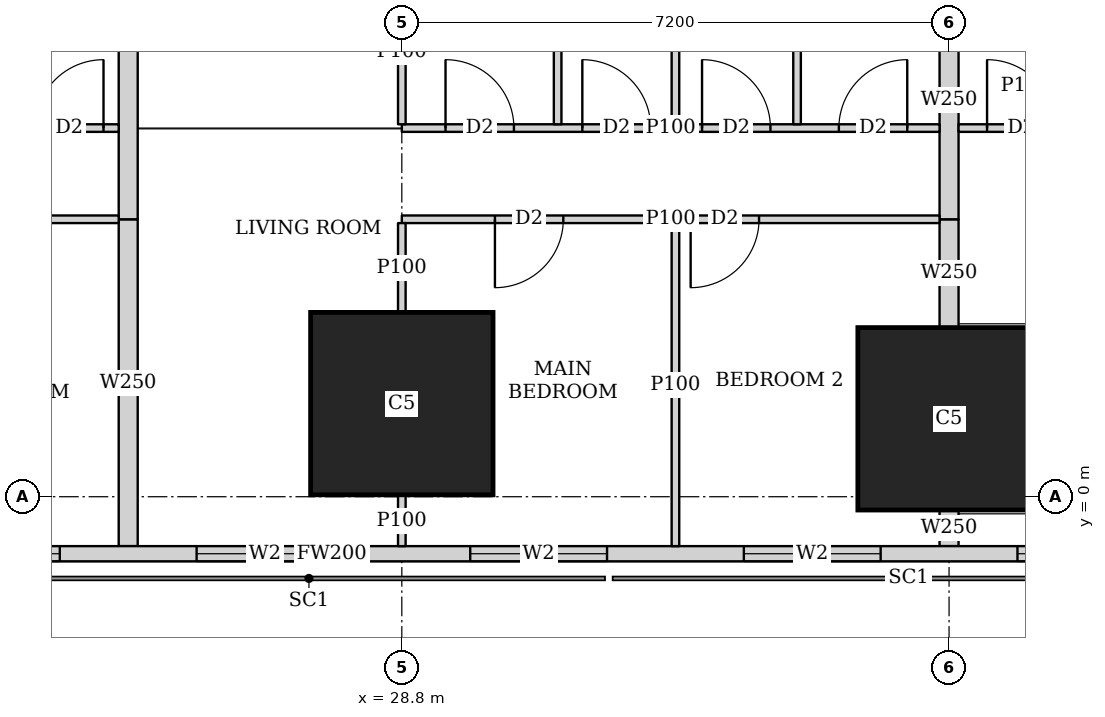
"""IFC4 building model, lengths in metres.
Left out: names, types, materials, properties, quantities, classifications, styles, units other than length and angle.
Written with IfcOpenShell. Run it as: python <this file> out.ifc"""

import sys

from ifc_helpers import new_model, si_unit, direction, frame, frame_2d, origin, origin_2d, place, context, subcontext, project, spatial, rectangle, extrude, element, fill, save


model = new_model("IFC4")
c1 = context("Model", 3, precision=1e-05, world=origin(), true_north=direction((0.0, 1.0)))
c2 = subcontext(c1, "Body", "Model", "MODEL_VIEW")
j1 = project(units=[si_unit("LENGTHUNIT", "METRE"), si_unit("PLANEANGLEUNIT", "RADIAN")], contexts=[c1])
p1 = place(None, origin())
s1 = spatial("IfcSite", under=j1, at=p1, CompositionType="ELEMENT")
p2 = place(p1, origin())
s2 = spatial("IfcBuilding", under=s1, at=p2, CompositionType="ELEMENT")
p3 = place(p2, frame((0.0, 0.0, 212.45)))
s3 = spatial("IfcBuildingStorey", under=s2, at=p3, CompositionType="ELEMENT", Elevation=212.45)
for number, where, z_axis, x_axis in (
    (1, (28.8, 1.225, 0.0), (0.0, 0.0, 1.0), (1.0, 0.0, 0.0)),
    (2, (36.0, 1.025, 0.0), (0.0, 0.0, 1.0), (1.0, 0.0, 0.0)),
):
    element("IfcColumn", number, at=place(p3, frame(where, z_axis=z_axis, x_axis=x_axis)), inside=s3, PredefinedType="COLUMN", context=c2, shape_type="SweptSolid", body=[
        extrude(rectangle(XDim=2.4, YDim=2.4, at=origin_2d()), origin(), (0.0, 0.0, 1.0), 3.75),
    ])
p4 = place(p3, frame((7.363, -0.75, 0.0), z_axis=(0.0, 0.0, 1.0), x_axis=(1.0, 0.0, 0.0)))
e3 = element("IfcWall", 3, at=p4, inside=s3, PredefinedType="SOLIDWALL", context=c2, shape_type="SweptSolid", body=[
    extrude(rectangle(XDim=40.428, YDim=0.2, at=frame_2d((20.214, 0.0))), origin(), (0.0, 0.0, 1.0), 3.5),
])
p5 = place(p4, frame((2.319, 0.0, 0.9)))
e4 = element("IfcOpeningElement", 4, at=p5, cuts=e3, PredefinedType="OPENING", context=c2, shape_type="SweptSolid", body=[
    extrude(rectangle(XDim=2.4, YDim=1.5, at=frame_2d((1.2, 0.75))), frame((0.0, 0.11, 0.0), z_axis=(0.0, -1.0, 0.0), x_axis=(1.0, 0.0, 0.0)), (0.0, 0.0, 1.0), 0.22),
])
p6 = place(p4, frame((7.937, 0.0, 0.9)))
e5 = element("IfcOpeningElement", 5, at=p6, cuts=e3, PredefinedType="OPENING", context=c2, shape_type="SweptSolid", body=[
    extrude(rectangle(XDim=1.8, YDim=1.5, at=frame_2d((0.9, 0.75))), frame((0.0, 0.11, 0.0), z_axis=(0.0, -1.0, 0.0), x_axis=(1.0, 0.0, 0.0)), (0.0, 0.0, 1.0), 0.22),
])
p7 = place(p4, frame((11.537, 0.0, 0.9)))
e6 = element("IfcOpeningElement", 6, at=p7, cuts=e3, PredefinedType="OPENING", context=c2, shape_type="SweptSolid", body=[
    extrude(rectangle(XDim=1.8, YDim=1.5, at=frame_2d((0.9, 0.75))), frame((0.0, 0.11, 0.0), z_axis=(0.0, -1.0, 0.0), x_axis=(1.0, 0.0, 0.0)), (0.0, 0.0, 1.0), 0.22),
])
p8 = place(p4, frame((15.137, 0.0, 0.9)))
e7 = element("IfcOpeningElement", 7, at=p8, cuts=e3, PredefinedType="OPENING", context=c2, shape_type="SweptSolid", body=[
    extrude(rectangle(XDim=1.8, YDim=1.5, at=frame_2d((0.9, 0.75))), frame((0.0, 0.11, 0.0), z_axis=(0.0, -1.0, 0.0), x_axis=(1.0, 0.0, 0.0)), (0.0, 0.0, 1.0), 0.22),
])
p9 = place(p4, frame((18.737, 0.0, 0.9)))
e8 = element("IfcOpeningElement", 8, at=p9, cuts=e3, PredefinedType="OPENING", context=c2, shape_type="SweptSolid", body=[
    extrude(rectangle(XDim=1.8, YDim=1.5, at=frame_2d((0.9, 0.75))), frame((0.0, 0.11, 0.0), z_axis=(0.0, -1.0, 0.0), x_axis=(1.0, 0.0, 0.0)), (0.0, 0.0, 1.0), 0.22),
])
p10 = place(p4, frame((22.337, 0.0, 0.9)))
e9 = element("IfcOpeningElement", 9, at=p10, cuts=e3, PredefinedType="OPENING", context=c2, shape_type="SweptSolid", body=[
    extrude(rectangle(XDim=1.8, YDim=1.5, at=frame_2d((0.9, 0.75))), frame((0.0, 0.11, 0.0), z_axis=(0.0, -1.0, 0.0), x_axis=(1.0, 0.0, 0.0)), (0.0, 0.0, 1.0), 0.22),
])
p11 = place(p4, frame((25.937, 0.0, 0.9)))
e10 = element("IfcOpeningElement", 10, at=p11, cuts=e3, PredefinedType="OPENING", context=c2, shape_type="SweptSolid", body=[
    extrude(rectangle(XDim=1.8, YDim=1.5, at=frame_2d((0.9, 0.75))), frame((0.0, 0.11, 0.0), z_axis=(0.0, -1.0, 0.0), x_axis=(1.0, 0.0, 0.0)), (0.0, 0.0, 1.0), 0.22),
])
p12 = place(p4, frame((29.537, 0.0, 0.9)))
e11 = element("IfcOpeningElement", 11, at=p12, cuts=e3, PredefinedType="OPENING", context=c2, shape_type="SweptSolid", body=[
    extrude(rectangle(XDim=1.8, YDim=1.5, at=frame_2d((0.9, 0.75))), frame((0.0, 0.11, 0.0), z_axis=(0.0, -1.0, 0.0), x_axis=(1.0, 0.0, 0.0)), (0.0, 0.0, 1.0), 0.22),
])
p13 = place(p3, frame((33.68, 42.723, 0.0), z_axis=(0.0, 0.0, 1.0), x_axis=(0.185601160014, -0.982625162207, 0.0)))
e12 = element("IfcWall", 12, at=p13, inside=s3, PredefinedType="SOLIDWALL", context=c2, shape_type="SweptSolid", body=[
    extrude(rectangle(XDim=41.051, YDim=0.15, at=frame_2d((20.526, 0.0))), origin(), (0.0, 0.0, 1.0), 2.5),
])
p14 = place(p13, frame((12.307, 0.0, 0.0)))
e13 = element("IfcOpeningElement", 13, at=p14, cuts=e12, PredefinedType="OPENING", context=c2, shape_type="SweptSolid", body=[
    extrude(rectangle(XDim=1.0, YDim=2.1, at=frame_2d((0.5, 1.05))), frame((0.0, 0.085, 0.0), z_axis=(0.0, -1.0, 0.0), x_axis=(1.0, 0.0, 0.0)), (0.0, 0.0, 1.0), 0.17),
])
p15 = place(p13, frame((16.123, 0.0, 0.0)))
e14 = element("IfcOpeningElement", 14, at=p15, cuts=e12, PredefinedType="OPENING", context=c2, shape_type="SweptSolid", body=[
    extrude(rectangle(XDim=1.0, YDim=2.1, at=frame_2d((0.5, 1.05))), frame((0.0, 0.085, 0.0), z_axis=(0.0, -1.0, 0.0), x_axis=(1.0, 0.0, 0.0)), (0.0, 0.0, 1.0), 0.17),
])
p16 = place(p13, frame((30.902, 0.0, 0.0)))
e15 = element("IfcOpeningElement", 15, at=p16, cuts=e12, PredefinedType="OPENING", context=c2, shape_type="SweptSolid", body=[
    extrude(rectangle(XDim=1.0, YDim=2.1, at=frame_2d((0.5, 1.05))), frame((0.0, 0.085, 0.0), z_axis=(0.0, -1.0, 0.0), x_axis=(1.0, 0.0, 0.0)), (0.0, 0.0, 1.0), 0.17),
])
p17 = place(p3, frame((25.075, 3.65, 0.0), z_axis=(0.0, 0.0, 1.0), x_axis=(-1.0, 0.0, 0.0)))
e16 = element("IfcWall", 16, at=p17, inside=s3, PredefinedType="PARTITIONING", context=c2, shape_type="SweptSolid", body=[
    extrude(rectangle(XDim=3.475, YDim=0.1, at=frame_2d((1.737, 0.0))), origin(), (0.0, 0.0, 1.0), 3.5),
])
p18 = place(p17, frame((2.375, 0.0, 0.0)))
e17 = element("IfcOpeningElement", 17, at=p18, cuts=e16, PredefinedType="OPENING", context=c2, shape_type="SweptSolid", body=[
    extrude(rectangle(XDim=0.9, YDim=2.1, at=frame_2d((0.45, 1.05))), frame((0.0, 0.06, 0.0), z_axis=(0.0, -1.0, 0.0), x_axis=(1.0, 0.0, 0.0)), (0.0, 0.0, 1.0), 0.12),
])
p19 = place(p3, frame((25.075, 4.85, 0.0), z_axis=(0.0, 0.0, 1.0), x_axis=(-1.0, 0.0, 0.0)))
e18 = element("IfcWall", 18, at=p19, inside=s3, PredefinedType="PARTITIONING", context=c2, shape_type="SweptSolid", body=[
    extrude(rectangle(XDim=3.475, YDim=0.1, at=frame_2d((1.737, 0.0))), origin(), (0.0, 0.0, 1.0), 3.5),
])
p20 = place(p19, frame((2.0, 0.0, 0.0)))
e19 = element("IfcOpeningElement", 19, at=p20, cuts=e18, PredefinedType="OPENING", context=c2, shape_type="SweptSolid", body=[
    extrude(rectangle(XDim=0.9, YDim=2.1, at=frame_2d((0.45, 1.05))), frame((0.0, 0.06, 0.0), z_axis=(0.0, -1.0, 0.0), x_axis=(1.0, 0.0, 0.0)), (0.0, 0.0, 1.0), 0.12),
])
p21 = place(p19, frame((0.2, 0.0, 0.0)))
e20 = element("IfcOpeningElement", 20, at=p21, cuts=e18, PredefinedType="OPENING", context=c2, shape_type="SweptSolid", body=[
    extrude(rectangle(XDim=0.9, YDim=2.1, at=frame_2d((0.45, 1.05))), frame((0.0, 0.06, 0.0), z_axis=(0.0, -1.0, 0.0), x_axis=(1.0, 0.0, 0.0)), (0.0, 0.0, 1.0), 0.12),
])
p22 = place(p3, frame((35.875, 3.65, 0.0), z_axis=(0.0, 0.0, 1.0), x_axis=(-1.0, 0.0, 0.0)))
e21 = element("IfcWall", 21, at=p22, inside=s3, PredefinedType="PARTITIONING", context=c2, shape_type="SweptSolid", body=[
    extrude(rectangle(XDim=7.075, YDim=0.1, at=frame_2d((3.538, 0.0))), origin(), (0.0, 0.0, 1.0), 3.5),
])
p23 = place(p22, frame((4.95, 0.0, 0.0)))
e22 = element("IfcOpeningElement", 22, at=p23, cuts=e21, PredefinedType="OPENING", context=c2, shape_type="SweptSolid", body=[
    extrude(rectangle(XDim=0.9, YDim=2.1, at=frame_2d((0.45, 1.05))), frame((0.0, 0.06, 0.0), z_axis=(0.0, -1.0, 0.0), x_axis=(1.0, 0.0, 0.0)), (0.0, 0.0, 1.0), 0.12),
])
p24 = place(p22, frame((2.375, 0.0, 0.0)))
e23 = element("IfcOpeningElement", 23, at=p24, cuts=e21, PredefinedType="OPENING", context=c2, shape_type="SweptSolid", body=[
    extrude(rectangle(XDim=0.9, YDim=2.1, at=frame_2d((0.45, 1.05))), frame((0.0, 0.06, 0.0), z_axis=(0.0, -1.0, 0.0), x_axis=(1.0, 0.0, 0.0)), (0.0, 0.0, 1.0), 0.12),
])
p25 = place(p3, frame((35.875, 4.85, 0.0), z_axis=(0.0, 0.0, 1.0), x_axis=(-1.0, 0.0, 0.0)))
e24 = element("IfcWall", 24, at=p25, inside=s3, PredefinedType="PARTITIONING", context=c2, shape_type="SweptSolid", body=[
    extrude(rectangle(XDim=7.075, YDim=0.1, at=frame_2d((3.538, 0.0))), origin(), (0.0, 0.0, 1.0), 3.5),
])
p26 = place(p25, frame((5.6, 0.0, 0.0)))
e25 = element("IfcOpeningElement", 25, at=p26, cuts=e24, PredefinedType="OPENING", context=c2, shape_type="SweptSolid", body=[
    extrude(rectangle(XDim=0.9, YDim=2.1, at=frame_2d((0.45, 1.05))), frame((0.0, 0.06, 0.0), z_axis=(0.0, -1.0, 0.0), x_axis=(1.0, 0.0, 0.0)), (0.0, 0.0, 1.0), 0.12),
])
p27 = place(p25, frame((2.225, 0.0, 0.0)))
e26 = element("IfcOpeningElement", 26, at=p27, cuts=e24, PredefinedType="OPENING", context=c2, shape_type="SweptSolid", body=[
    extrude(rectangle(XDim=0.9, YDim=2.1, at=frame_2d((0.45, 1.05))), frame((0.0, 0.06, 0.0), z_axis=(0.0, -1.0, 0.0), x_axis=(1.0, 0.0, 0.0)), (0.0, 0.0, 1.0), 0.12),
])
p28 = place(p25, frame((3.8, 0.0, 0.0)))
e27 = element("IfcOpeningElement", 27, at=p28, cuts=e24, PredefinedType="OPENING", context=c2, shape_type="SweptSolid", body=[
    extrude(rectangle(XDim=0.9, YDim=2.1, at=frame_2d((0.45, 1.05))), frame((0.0, 0.06, 0.0), z_axis=(0.0, -1.0, 0.0), x_axis=(1.0, 0.0, 0.0)), (0.0, 0.0, 1.0), 0.12),
])
p29 = place(p25, frame((0.425, 0.0, 0.0)))
e28 = element("IfcOpeningElement", 28, at=p29, cuts=e24, PredefinedType="OPENING", context=c2, shape_type="SweptSolid", body=[
    extrude(rectangle(XDim=0.9, YDim=2.1, at=frame_2d((0.45, 1.05))), frame((0.0, 0.06, 0.0), z_axis=(0.0, -1.0, 0.0), x_axis=(1.0, 0.0, 0.0)), (0.0, 0.0, 1.0), 0.12),
])
p30 = place(p3, frame((28.8, -0.65, 0.0), z_axis=(0.0, 0.0, 1.0), x_axis=(0.0, 1.0, 0.0)))
e29 = element("IfcWall", 29, at=p30, inside=s3, PredefinedType="PARTITIONING", context=c2, shape_type="SweptSolid", body=[
    extrude(rectangle(XDim=0.674, YDim=0.1, at=frame_2d((0.337, 0.0))), origin(), (0.0, 0.0, 1.0), 3.5),
])
p31 = place(p3, frame((28.8, 2.426, 0.0), z_axis=(0.0, 0.0, 1.0), x_axis=(0.0, 1.0, 0.0)))
e30 = element("IfcWall", 30, at=p31, inside=s3, PredefinedType="PARTITIONING", context=c2, shape_type="SweptSolid", body=[
    extrude(rectangle(XDim=1.174, YDim=0.1, at=frame_2d((0.587, 0.0))), origin(), (0.0, 0.0, 1.0), 3.5),
])
p32 = place(p3, frame((32.4, -0.65, 0.0), z_axis=(0.0, 0.0, 1.0), x_axis=(0.0, 1.0, 0.0)))
e31 = element("IfcWall", 31, at=p32, inside=s3, PredefinedType="PARTITIONING", context=c2, shape_type="SweptSolid", body=[
    extrude(rectangle(XDim=4.25, YDim=0.1, at=frame_2d((2.125, 0.0))), origin(), (0.0, 0.0, 1.0), 2.05),
])
p33 = place(p3, frame((28.8, 4.9, 0.0), z_axis=(0.0, 0.0, 1.0), x_axis=(0.0, 1.0, 0.0)))
e32 = element("IfcWall", 32, at=p33, inside=s3, PredefinedType="PARTITIONING", context=c2, shape_type="SweptSolid", body=[
    extrude(rectangle(XDim=1.899, YDim=0.1, at=frame_2d((0.95, 0.0))), origin(), (0.0, 0.0, 1.0), 3.5),
])
for number, where, z_axis, x_axis in (
    (33, (32.4, 4.9, 0.0), (0.0, 0.0, 1.0), (0.0, 1.0, 0.0)),
    (34, (30.85, 4.9, 0.0), (0.0, 0.0, 1.0), (0.0, 1.0, 0.0)),
    (35, (34.0, 4.9, 0.0), (0.0, 0.0, 1.0), (0.0, 1.0, 0.0)),
):
    element("IfcWall", number, at=place(p3, frame(where, z_axis=z_axis, x_axis=x_axis)), inside=s3, PredefinedType="PARTITIONING", context=c2, shape_type="SweptSolid", body=[
        extrude(rectangle(XDim=3.525, YDim=0.1, at=frame_2d((1.763, 0.0))), origin(), (0.0, 0.0, 1.0), 3.5),
    ])
p34 = place(p3, frame((25.2, -0.65, 0.0), z_axis=(0.0, 0.0, 1.0), x_axis=(0.0, 1.0, 0.0)))
e36 = element("IfcWall", 36, at=p34, inside=s3, PredefinedType="SOLIDWALL", context=c2, shape_type="SweptSolid", body=[
    extrude(rectangle(XDim=4.3, YDim=0.25, at=frame_2d((2.15, 0.0))), origin(), (0.0, 0.0, 1.0), 2.05),
])
p35 = place(p3, frame((25.2, 3.65, 0.0), z_axis=(0.0, 0.0, 1.0), x_axis=(0.0, 1.0, 0.0)))
e37 = element("IfcWall", 37, at=p35, inside=s3, PredefinedType="SOLIDWALL", context=c2, shape_type="SweptSolid", body=[
    extrude(rectangle(XDim=4.775, YDim=0.25, at=frame_2d((2.388, 0.0))), origin(), (0.0, 0.0, 1.0), 3.5),
])
p36 = place(p3, frame((37.89, 4.85, 0.0), z_axis=(0.0, 0.0, 1.0), x_axis=(-1.0, 0.0, 0.0)))
e38 = element("IfcWall", 38, at=p36, inside=s3, PredefinedType="PARTITIONING", context=c2, shape_type="SweptSolid", body=[
    extrude(rectangle(XDim=1.765, YDim=0.1, at=frame_2d((0.882, 0.0))), origin(), (0.0, 0.0, 1.0), 3.5),
])
p37 = place(p36, frame((0.49, 0.0, 0.0)))
e39 = element("IfcOpeningElement", 39, at=p37, cuts=e38, PredefinedType="OPENING", context=c2, shape_type="SweptSolid", body=[
    extrude(rectangle(XDim=0.9, YDim=2.1, at=frame_2d((0.45, 1.05))), frame((0.0, 0.06, 0.0), z_axis=(0.0, -1.0, 0.0), x_axis=(1.0, 0.0, 0.0)), (0.0, 0.0, 1.0), 0.12),
])
p38 = place(p3, frame((36.0, -0.65, 0.0), z_axis=(0.0, 0.0, 1.0), x_axis=(0.0, 1.0, 0.0)))
e40 = element("IfcWall", 40, at=p38, inside=s3, PredefinedType="SOLIDWALL", context=c2, shape_type="SweptSolid", body=[
    extrude(rectangle(XDim=0.474, YDim=0.25, at=frame_2d((0.237, 0.0))), origin(), (0.0, 0.0, 1.0), 2.05),
])
p39 = place(p3, frame((36.0, 2.226, 0.0), z_axis=(0.0, 0.0, 1.0), x_axis=(0.0, 1.0, 0.0)))
e41 = element("IfcWall", 41, at=p39, inside=s3, PredefinedType="SOLIDWALL", context=c2, shape_type="SweptSolid", body=[
    extrude(rectangle(XDim=1.424, YDim=0.25, at=frame_2d((0.712, 0.0))), origin(), (0.0, 0.0, 1.0), 2.05),
])
p40 = place(p3, frame((36.0, 3.65, 0.0), z_axis=(0.0, 0.0, 1.0), x_axis=(0.0, 1.0, 0.0)))
e42 = element("IfcWall", 42, at=p40, inside=s3, PredefinedType="SOLIDWALL", context=c2, shape_type="SweptSolid", body=[
    extrude(rectangle(XDim=3.149, YDim=0.25, at=frame_2d((1.575, 0.0))), origin(), (0.0, 0.0, 1.0), 3.5),
])
p41 = place(p8, origin())
e43 = element("IfcWindow", 43, at=p41, inside=s3, PartitioningType="SINGLE_PANEL", PredefinedType="WINDOW", context=c2, shape_type="SweptSolid", body=[
    extrude(rectangle(XDim=1.8, YDim=1.5, at=frame_2d((0.9, 0.75))), frame((0.0, 0.03, 0.0), z_axis=(0.0, -1.0, 0.0), x_axis=(1.0, 0.0, 0.0)), (0.0, 0.0, 1.0), 0.06),
])
fill(e7, e43)
p42 = place(p9, origin())
e44 = element("IfcWindow", 44, at=p42, inside=s3, PartitioningType="SINGLE_PANEL", PredefinedType="WINDOW", context=c2, shape_type="SweptSolid", body=[
    extrude(rectangle(XDim=1.8, YDim=1.5, at=frame_2d((0.9, 0.75))), frame((0.0, 0.03, 0.0), z_axis=(0.0, -1.0, 0.0), x_axis=(1.0, 0.0, 0.0)), (0.0, 0.0, 1.0), 0.06),
])
fill(e8, e44)
p43 = place(p10, origin())
e45 = element("IfcWindow", 45, at=p43, inside=s3, PartitioningType="SINGLE_PANEL", PredefinedType="WINDOW", context=c2, shape_type="SweptSolid", body=[
    extrude(rectangle(XDim=1.8, YDim=1.5, at=frame_2d((0.9, 0.75))), frame((0.0, 0.03, 0.0), z_axis=(0.0, -1.0, 0.0), x_axis=(1.0, 0.0, 0.0)), (0.0, 0.0, 1.0), 0.06),
])
fill(e9, e45)
p44 = place(p11, origin())
e46 = element("IfcWindow", 46, at=p44, inside=s3, PartitioningType="SINGLE_PANEL", PredefinedType="WINDOW", context=c2, shape_type="SweptSolid", body=[
    extrude(rectangle(XDim=1.8, YDim=1.5, at=frame_2d((0.9, 0.75))), frame((0.0, 0.03, 0.0), z_axis=(0.0, -1.0, 0.0), x_axis=(1.0, 0.0, 0.0)), (0.0, 0.0, 1.0), 0.06),
])
fill(e10, e46)
p45 = place(p12, origin())
e47 = element("IfcWindow", 47, at=p45, inside=s3, PartitioningType="SINGLE_PANEL", PredefinedType="WINDOW", context=c2, shape_type="SweptSolid", body=[
    extrude(rectangle(XDim=1.8, YDim=1.5, at=frame_2d((0.9, 0.75))), frame((0.0, 0.03, 0.0), z_axis=(0.0, -1.0, 0.0), x_axis=(1.0, 0.0, 0.0)), (0.0, 0.0, 1.0), 0.06),
])
fill(e11, e47)
p46 = place(p21, origin())
e48 = element("IfcDoor", 48, at=p46, inside=s3, OperationType="SINGLE_SWING_RIGHT", PredefinedType="DOOR", context=c2, shape_type="SweptSolid", body=[
    extrude(rectangle(XDim=0.9, YDim=2.1, at=frame_2d((0.45, 1.05))), frame((0.0, 0.025, 0.0), z_axis=(0.0, -1.0, 0.0), x_axis=(1.0, 0.0, 0.0)), (0.0, 0.0, 1.0), 0.05),
])
fill(e20, e48)
p47 = place(p23, origin())
e49 = element("IfcDoor", 49, at=p47, inside=s3, OperationType="SINGLE_SWING_RIGHT", PredefinedType="DOOR", context=c2, shape_type="SweptSolid", body=[
    extrude(rectangle(XDim=0.9, YDim=2.1, at=frame_2d((0.45, 1.05))), frame((0.0, 0.025, 0.0), z_axis=(0.0, -1.0, 0.0), x_axis=(1.0, 0.0, 0.0)), (0.0, 0.0, 1.0), 0.05),
])
fill(e22, e49)
p48 = place(p24, origin())
e50 = element("IfcDoor", 50, at=p48, inside=s3, OperationType="SINGLE_SWING_RIGHT", PredefinedType="DOOR", context=c2, shape_type="SweptSolid", body=[
    extrude(rectangle(XDim=0.9, YDim=2.1, at=frame_2d((0.45, 1.05))), frame((0.0, 0.025, 0.0), z_axis=(0.0, -1.0, 0.0), x_axis=(1.0, 0.0, 0.0)), (0.0, 0.0, 1.0), 0.05),
])
fill(e23, e50)
p49 = place(p26, origin())
e51 = element("IfcDoor", 51, at=p49, inside=s3, OperationType="SINGLE_SWING_LEFT", PredefinedType="DOOR", context=c2, shape_type="SweptSolid", body=[
    extrude(rectangle(XDim=0.9, YDim=2.1, at=frame_2d((0.45, 1.05))), frame((0.0, 0.025, 0.0), z_axis=(0.0, -1.0, 0.0), x_axis=(1.0, 0.0, 0.0)), (0.0, 0.0, 1.0), 0.05),
])
fill(e25, e51)
p50 = place(p27, origin())
e52 = element("IfcDoor", 52, at=p50, inside=s3, OperationType="SINGLE_SWING_LEFT", PredefinedType="DOOR", context=c2, shape_type="SweptSolid", body=[
    extrude(rectangle(XDim=0.9, YDim=2.1, at=frame_2d((0.45, 1.05))), frame((0.0, 0.025, 0.0), z_axis=(0.0, -1.0, 0.0), x_axis=(1.0, 0.0, 0.0)), (0.0, 0.0, 1.0), 0.05),
])
fill(e26, e52)
p51 = place(p28, origin())
e53 = element("IfcDoor", 53, at=p51, inside=s3, OperationType="SINGLE_SWING_LEFT", PredefinedType="DOOR", context=c2, shape_type="SweptSolid", body=[
    extrude(rectangle(XDim=0.9, YDim=2.1, at=frame_2d((0.45, 1.05))), frame((0.0, 0.025, 0.0), z_axis=(0.0, -1.0, 0.0), x_axis=(1.0, 0.0, 0.0)), (0.0, 0.0, 1.0), 0.05),
])
fill(e27, e53)
p52 = place(p29, origin())
e54 = element("IfcDoor", 54, at=p52, inside=s3, OperationType="SINGLE_SWING_RIGHT", PredefinedType="DOOR", context=c2, shape_type="SweptSolid", body=[
    extrude(rectangle(XDim=0.9, YDim=2.1, at=frame_2d((0.45, 1.05))), frame((0.0, 0.025, 0.0), z_axis=(0.0, -1.0, 0.0), x_axis=(1.0, 0.0, 0.0)), (0.0, 0.0, 1.0), 0.05),
])
fill(e28, e54)
p53 = place(p37, origin())
e55 = element("IfcDoor", 55, at=p53, inside=s3, OperationType="SINGLE_SWING_LEFT", PredefinedType="DOOR", context=c2, shape_type="SweptSolid", body=[
    extrude(rectangle(XDim=0.9, YDim=2.1, at=frame_2d((0.45, 1.05))), frame((0.0, 0.025, 0.0), z_axis=(0.0, -1.0, 0.0), x_axis=(1.0, 0.0, 0.0)), (0.0, 0.0, 1.0), 0.05),
])
fill(e39, e55)
save(model, sys.argv[1])
